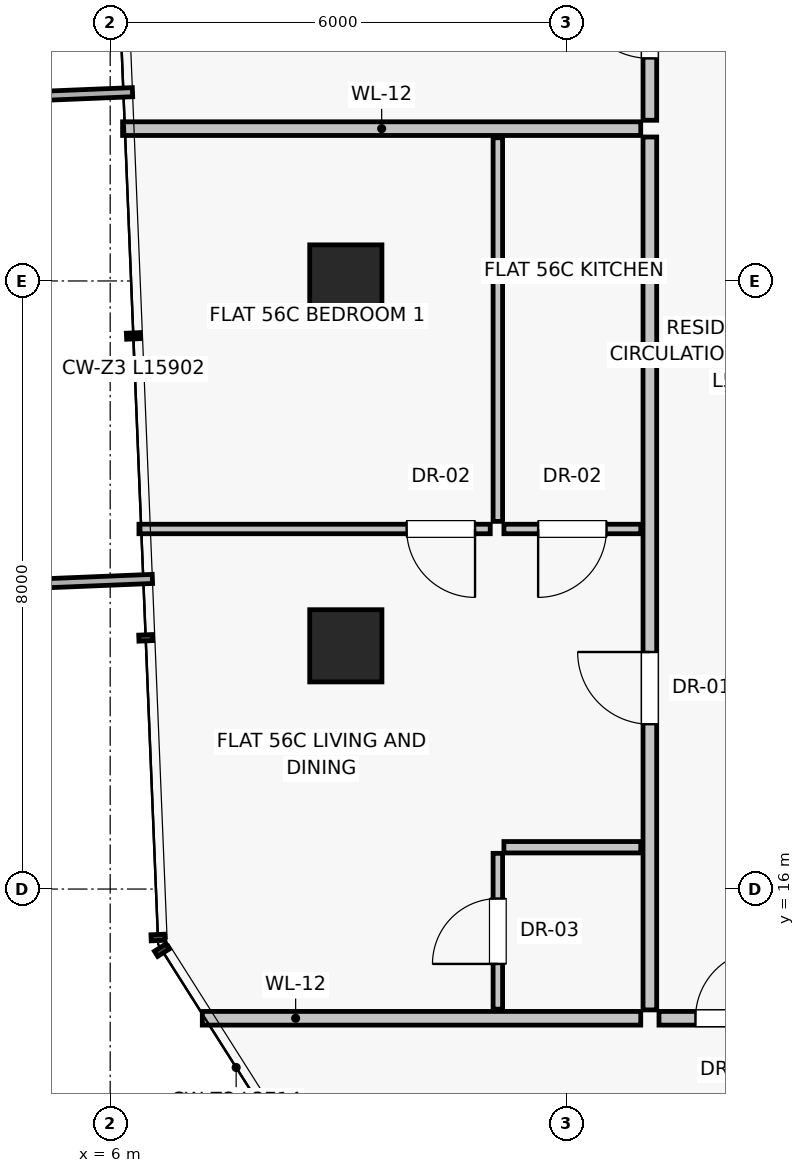
"""IFC4 building model, lengths in metres.
Left out: names, types, materials, properties, quantities, classifications, styles, units other than length and angle.
Written with IfcOpenShell. Run it as: python <this file> out.ifc"""

import sys

from ifc_helpers import new_model, si_unit, direction, frame, frame_2d, origin, origin_2d, place, context, subcontext, project, spatial, rectangle, extrude, source, transform, mapped, element, fill, save


model = new_model("IFC4")
c1 = context("Model", 3, precision=1e-05, world=origin(), true_north=direction((0.0, 1.0)))
c2 = subcontext(c1, "Body", "Model", "MODEL_VIEW")
j1 = project(units=[si_unit("LENGTHUNIT", "METRE"), si_unit("PLANEANGLEUNIT", "RADIAN")], contexts=[c1])
p1 = place(None, origin())
s1 = spatial("IfcSite", under=j1, at=p1, CompositionType="ELEMENT")
p2 = place(p1, origin())
s2 = spatial("IfcBuilding", under=s1, at=p2, CompositionType="ELEMENT")
p3 = place(p2, frame((0.0, 0.0, 198.35)))
s3 = spatial("IfcBuildingStorey", under=s2, at=p3, CompositionType="ELEMENT", Elevation=198.35)
for number, where, z_axis, x_axis in (
    (1, (9.1, 24.0, 0.0), (0.0, 0.0, 1.0), (1.0, 0.0, 0.0)),
    (2, (9.1, 19.2, 0.0), (0.0, 0.0, 1.0), (1.0, 0.0, 0.0)),
):
    element("IfcColumn", number, at=place(p3, frame(where, z_axis=z_axis, x_axis=x_axis)), inside=s3, PredefinedType="COLUMN", context=c2, shape_type="SweptSolid", body=[
        extrude(rectangle(XDim=0.95, YDim=0.95, at=origin_2d()), origin(), (0.0, 0.0, 1.0), 3.25),
    ])
p4 = place(p3, frame((12.98, 14.3, 0.0), z_axis=(0.0, 0.0, 1.0), x_axis=(-1.0, 0.0, 0.0)))
e3 = element("IfcWall", 3, at=p4, inside=s3, PredefinedType="PARTITIONING", context=c2, shape_type="SweptSolid", body=[
    extrude(rectangle(XDim=5.768, YDim=0.18, at=frame_2d((2.884, 0.0))), origin(), (0.0, 0.0, 1.0), 3.015),
])
p5 = place(p3, frame((13.1, 14.41, 0.0), z_axis=(0.0, 0.0, 1.0), x_axis=(0.0, 1.0, 0.0)))
e4 = element("IfcWall", 4, at=p5, inside=s3, PredefinedType="PARTITIONING", context=c2, shape_type="SweptSolid", body=[
    extrude(rectangle(XDim=11.484, YDim=0.18, at=frame_2d((5.742, 0.0))), origin(), (0.0, 0.0, 1.0), 2.662),
])
p6 = place(p5, frame((3.759, 0.0, 0.0)))
e5 = element("IfcOpeningElement", 5, at=p6, cuts=e4, PredefinedType="OPENING", context=c2, shape_type="SweptSolid", body=[
    extrude(rectangle(XDim=0.95, YDim=2.02, at=frame_2d((0.475, 1.01))), frame((0.0, 0.1, 0.0), z_axis=(0.0, -1.0, 0.0), x_axis=(1.0, 0.0, 0.0)), (0.0, 0.0, 1.0), 0.2),
])
p7 = place(p3, frame((12.98, 16.55, 0.0), z_axis=(0.0, 0.0, 1.0), x_axis=(-1.0, 0.0, 0.0)))
e6 = element("IfcWall", 6, at=p7, inside=s3, PredefinedType="PARTITIONING", context=c2, shape_type="SweptSolid", body=[
    extrude(rectangle(XDim=1.8, YDim=0.15, at=frame_2d((0.9, 0.0))), origin(), (0.0, 0.0, 1.0), 3.015),
])
p8 = place(p3, frame((11.1, 14.42, 0.0), z_axis=(0.0, 0.0, 1.0), x_axis=(0.0, 1.0, 0.0)))
e7 = element("IfcWall", 7, at=p8, inside=s3, PredefinedType="PARTITIONING", context=c2, shape_type="SweptSolid", body=[
    extrude(rectangle(XDim=2.05, YDim=0.125, at=frame_2d((1.025, 0.0))), origin(), (0.0, 0.0, 1.0), 3.015),
])
p9 = place(p8, frame((0.595, 0.0, 0.0)))
e8 = element("IfcOpeningElement", 8, at=p9, cuts=e7, PredefinedType="OPENING", context=c2, shape_type="SweptSolid", body=[
    extrude(rectangle(XDim=0.86, YDim=2.01, at=frame_2d((0.43, 1.005))), frame((0.0, 0.073, 0.0), z_axis=(0.0, -1.0, 0.0), x_axis=(1.0, 0.0, 0.0)), (0.0, 0.0, 1.0), 0.145),
])
p10 = place(p3, frame((12.98, 20.737, 0.0), z_axis=(0.0, 0.0, 1.0), x_axis=(-1.0, 0.0, 0.0)))
e9 = element("IfcWall", 9, at=p10, inside=s3, PredefinedType="PARTITIONING", context=c2, shape_type="SweptSolid", body=[
    extrude(rectangle(XDim=1.8, YDim=0.125, at=frame_2d((0.9, 0.0))), origin(), (0.0, 0.0, 1.0), 3.015),
])
p11 = place(p10, frame((0.45, 0.0, 0.0)))
e10 = element("IfcOpeningElement", 10, at=p11, cuts=e9, PredefinedType="OPENING", context=c2, shape_type="SweptSolid", body=[
    extrude(rectangle(XDim=0.9, YDim=2.01, at=frame_2d((0.45, 1.005))), frame((0.0, 0.073, 0.0), z_axis=(0.0, -1.0, 0.0), x_axis=(1.0, 0.0, 0.0)), (0.0, 0.0, 1.0), 0.145),
])
p12 = place(p3, frame((11.1, 20.837, 0.0), z_axis=(0.0, 0.0, 1.0), x_axis=(0.0, 1.0, 0.0)))
e11 = element("IfcWall", 11, at=p12, inside=s3, PredefinedType="PARTITIONING", context=c2, shape_type="SweptSolid", body=[
    extrude(rectangle(XDim=5.047, YDim=0.125, at=frame_2d((2.523, 0.0))), origin(), (0.0, 0.0, 1.0), 3.015),
])
p13 = place(p3, frame((11.0, 20.737, 0.0), z_axis=(0.0, 0.0, 1.0), x_axis=(-1.0, 0.0, 0.0)))
e12 = element("IfcWall", 12, at=p13, inside=s3, PredefinedType="PARTITIONING", context=c2, shape_type="SweptSolid", body=[
    extrude(rectangle(XDim=4.622, YDim=0.125, at=frame_2d((2.311, 0.0))), origin(), (0.0, 0.0, 1.0), 3.015),
])
p14 = place(p13, frame((0.2, 0.0, 0.0)))
e13 = element("IfcOpeningElement", 13, at=p14, cuts=e12, PredefinedType="OPENING", context=c2, shape_type="SweptSolid", body=[
    extrude(rectangle(XDim=0.9, YDim=2.01, at=frame_2d((0.45, 1.005))), frame((0.0, 0.073, 0.0), z_axis=(0.0, -1.0, 0.0), x_axis=(1.0, 0.0, 0.0)), (0.0, 0.0, 1.0), 0.145),
])
p15 = place(p3, frame((12.98, 26.004, 0.0), z_axis=(0.0, 0.0, 1.0), x_axis=(-1.0, 0.0, 0.0)))
e14 = element("IfcWall", 14, at=p15, inside=s3, PredefinedType="PARTITIONING", context=c2, shape_type="SweptSolid", body=[
    extrude(rectangle(XDim=6.817, YDim=0.18, at=frame_2d((3.408, 0.0))), origin(), (0.0, 0.0, 1.0), 3.015),
])
p16 = place(p3, frame((13.1, 26.114, 0.0), z_axis=(0.0, 0.0, 1.0), x_axis=(0.0, 1.0, 0.0)))
e15 = element("IfcWall", 15, at=p16, inside=s3, PredefinedType="PARTITIONING", context=c2, shape_type="SweptSolid", body=[
    extrude(rectangle(XDim=2.628, YDim=0.18, at=frame_2d((1.314, 0.0))), origin(), (0.0, 0.0, 1.0), 2.662),
])
p17 = place(p16, frame((0.814, 0.0, 0.0)))
e16 = element("IfcOpeningElement", 16, at=p17, cuts=e15, PredefinedType="OPENING", context=c2, shape_type="SweptSolid", body=[
    extrude(rectangle(XDim=1.0, YDim=2.01, at=frame_2d((0.5, 1.005))), frame((0.0, 0.1, 0.0), z_axis=(0.0, -1.0, 0.0), x_axis=(1.0, 0.0, 0.0)), (0.0, 0.0, 1.0), 0.2),
])
p18 = place(p3, frame((13.22, 14.3, 0.0), z_axis=(0.0, 0.0, 1.0), x_axis=(1.0, 0.0, 0.0)))
e17 = element("IfcWall", 17, at=p18, inside=s3, PredefinedType="PARTITIONING", context=c2, shape_type="SweptSolid", body=[
    extrude(rectangle(XDim=1.86, YDim=0.18, at=frame_2d((0.93, 0.0))), origin(), (0.0, 0.0, 1.0), 3.015),
])
p19 = place(p18, frame((0.48, 0.0, 0.0)))
e18 = element("IfcOpeningElement", 18, at=p19, cuts=e17, PredefinedType="OPENING", context=c2, shape_type="SweptSolid", body=[
    extrude(rectangle(XDim=0.9, YDim=2.01, at=frame_2d((0.45, 1.005))), frame((0.0, 0.1, 0.0), z_axis=(0.0, -1.0, 0.0), x_axis=(1.0, 0.0, 0.0)), (0.0, 0.0, 1.0), 0.2),
])
m1 = source(origin(), c2, "Body", "SweptSolid", [
    extrude(rectangle(XDim=0.95, YDim=2.02, at=frame_2d((0.475, 1.01))), frame((0.0, 0.025, 0.0), z_axis=(0.0, -1.0, 0.0), x_axis=(1.0, 0.0, 0.0)), (0.0, 0.0, 1.0), 0.05),
])
p20 = place(p6, origin())
e19 = element("IfcDoor", 19, at=p20, inside=s3, OperationType="SINGLE_SWING_RIGHT", PredefinedType="DOOR", context=c2, shape_type="MappedRepresentation", body=[
    mapped(m1, transform((0.0, 0.0, 0.0), scale=1.0)),
])
fill(e5, e19)
m2 = source(origin(), c2, "Body", "SweptSolid", [
    extrude(rectangle(XDim=0.86, YDim=2.01, at=frame_2d((0.43, 1.005))), frame((0.0, 0.025, 0.0), z_axis=(0.0, -1.0, 0.0), x_axis=(1.0, 0.0, 0.0)), (0.0, 0.0, 1.0), 0.05),
])
p21 = place(p9, origin())
e20 = element("IfcDoor", 20, at=p21, inside=s3, OperationType="SINGLE_SWING_LEFT", PredefinedType="DOOR", context=c2, shape_type="MappedRepresentation", body=[
    mapped(m2, transform((0.0, 0.0, 0.0), scale=1.0)),
])
fill(e8, e20)
m3 = source(origin(), c2, "Body", "SweptSolid", [
    extrude(rectangle(XDim=0.9, YDim=2.01, at=frame_2d((0.45, 1.005))), frame((0.0, 0.025, 0.0), z_axis=(0.0, -1.0, 0.0), x_axis=(1.0, 0.0, 0.0)), (0.0, 0.0, 1.0), 0.05),
])
p22 = place(p11, origin())
e21 = element("IfcDoor", 21, at=p22, inside=s3, OperationType="SINGLE_SWING_RIGHT", PredefinedType="DOOR", context=c2, shape_type="MappedRepresentation", body=[
    mapped(m3, transform((0.0, 0.0, 0.0), scale=1.0)),
])
fill(e10, e21)
p23 = place(p14, origin())
e22 = element("IfcDoor", 22, at=p23, inside=s3, OperationType="SINGLE_SWING_LEFT", PredefinedType="DOOR", context=c2, shape_type="MappedRepresentation", body=[
    mapped(m3, transform((0.0, 0.0, 0.0), scale=1.0)),
])
fill(e13, e22)
m4 = source(origin(), c2, "Body", "SweptSolid", [
    extrude(rectangle(XDim=1.0, YDim=2.01, at=frame_2d((0.5, 1.005))), frame((0.0, 0.025, 0.0), z_axis=(0.0, -1.0, 0.0), x_axis=(1.0, 0.0, 0.0)), (0.0, 0.0, 1.0), 0.05),
])
p24 = place(p17, origin())
e23 = element("IfcDoor", 23, at=p24, inside=s3, OperationType="SINGLE_SWING_RIGHT", PredefinedType="DOOR", context=c2, shape_type="MappedRepresentation", body=[
    mapped(m4, transform((0.0, 0.0, 0.0), scale=1.0)),
])
fill(e16, e23)
p25 = place(p19, origin())
e24 = element("IfcDoor", 24, at=p25, inside=s3, OperationType="SINGLE_SWING_RIGHT", PredefinedType="DOOR", context=c2, shape_type="MappedRepresentation", body=[
    mapped(m3, transform((0.0, 0.0, 0.0), scale=1.0)),
])
fill(e18, e24)
save(model, sys.argv[1])
